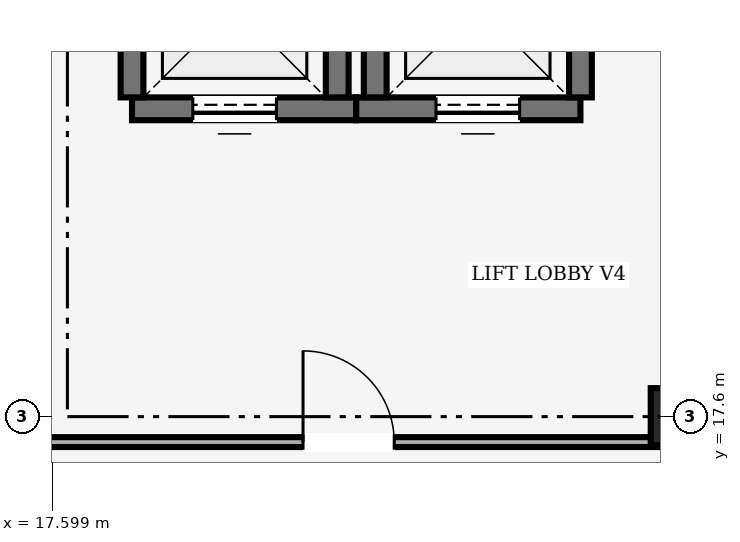
"""IFC4 building model, lengths in metres.
Left out: names, types, materials, properties, quantities, classifications, styles, units other than length and angle.
Written with IfcOpenShell. Run it as: python <this file> out.ifc"""

import sys

from ifc_helpers import new_model, si_unit, direction, frame, frame_2d, origin, origin_2d, place, context, subcontext, project, spatial, rectangle, extrude, element, fill, save


model = new_model("IFC4")
c1 = context("Model", 3, precision=1e-05, world=origin(), true_north=direction((0.0, 1.0)))
c2 = subcontext(c1, "Body", "Model", "MODEL_VIEW")
j1 = project(units=[si_unit("LENGTHUNIT", "METRE"), si_unit("PLANEANGLEUNIT", "RADIAN")], contexts=[c1])
p1 = place(None, origin())
s1 = spatial("IfcSite", under=j1, at=p1, CompositionType="ELEMENT")
p2 = place(p1, origin())
s2 = spatial("IfcBuilding", under=s1, at=p2, CompositionType="ELEMENT")
p3 = place(p2, frame((0.0, 0.0, 15.6)))
s3 = spatial("IfcBuildingStorey", under=s2, at=p3, CompositionType="ELEMENT", Elevation=15.6)
p4 = place(p3, frame((25.8, 17.6, 0.0), z_axis=(0.0, 0.0, 1.0), x_axis=(1.0, 0.0, 0.0)))
e1 = element("IfcColumn", 1, at=p4, inside=s3, PredefinedType="COLUMN", context=c2, shape_type="SweptSolid", body=[
    extrude(rectangle(XDim=0.65, YDim=0.75, at=origin_2d()), origin(), (0.0, 0.0, 1.0), 3.2),
])
p5 = place(p3, frame((21.6, 21.65, 0.0), z_axis=(0.0, 0.0, 1.0), x_axis=(-1.0, 0.0, 0.0)))
e2 = element("IfcWall", 2, at=p5, inside=s3, PredefinedType="SHEAR", context=c2, shape_type="SweptSolid", body=[
    extrude(rectangle(XDim=2.95, YDim=0.3, at=frame_2d((1.475, 0.0))), origin(), (0.0, 0.0, 1.0), 3.2),
])
p6 = place(p5, frame((1.05, 0.0, 0.0)))
e3 = element("IfcOpeningElement", 3, at=p6, cuts=e2, PredefinedType="OPENING", context=c2, shape_type="SweptSolid", body=[
    extrude(rectangle(XDim=1.1, YDim=2.1, at=frame_2d((0.55, 1.05))), frame((0.0, 0.15, 0.0), z_axis=(0.0, -1.0, 0.0), x_axis=(1.0, 0.0, 0.0)), (0.0, 0.0, 1.0), 0.3),
])
for number, where, z_axis, x_axis in (
    (4, (18.65, 21.8, 0.0), (0.0, 0.0, 1.0), (0.0, 1.0, 0.0)),
    (5, (21.35, 24.2, 0.0), (0.0, 0.0, 1.0), (0.0, -1.0, 0.0)),
):
    element("IfcWall", number, at=place(p3, frame(where, z_axis=z_axis, x_axis=x_axis)), inside=s3, PredefinedType="SHEAR", context=c2, shape_type="SweptSolid", body=[
        extrude(rectangle(XDim=2.4, YDim=0.3, at=frame_2d((1.2, 0.0))), origin(), (0.0, 0.0, 1.0), 3.2),
    ])
p7 = place(p3, frame((24.55, 21.65, 0.0), z_axis=(0.0, 0.0, 1.0), x_axis=(-1.0, 0.0, 0.0)))
e6 = element("IfcWall", 6, at=p7, inside=s3, PredefinedType="SHEAR", context=c2, shape_type="SweptSolid", body=[
    extrude(rectangle(XDim=2.95, YDim=0.3, at=frame_2d((1.475, 0.0))), origin(), (0.0, 0.0, 1.0), 3.2),
])
p8 = place(p7, frame((0.8, 0.0, 0.0)))
e7 = element("IfcOpeningElement", 7, at=p8, cuts=e6, PredefinedType="OPENING", context=c2, shape_type="SweptSolid", body=[
    extrude(rectangle(XDim=1.1, YDim=2.1, at=frame_2d((0.55, 1.05))), frame((0.0, 0.15, 0.0), z_axis=(0.0, -1.0, 0.0), x_axis=(1.0, 0.0, 0.0)), (0.0, 0.0, 1.0), 0.3),
])
for number, where, z_axis, x_axis in (
    (8, (21.85, 21.8, 0.0), (0.0, 0.0, 1.0), (0.0, 1.0, 0.0)),
    (9, (24.55, 24.2, 0.0), (0.0, 0.0, 1.0), (0.0, -1.0, 0.0)),
):
    element("IfcWall", number, at=place(p3, frame(where, z_axis=z_axis, x_axis=x_axis)), inside=s3, PredefinedType="SHEAR", context=c2, shape_type="SweptSolid", body=[
        extrude(rectangle(XDim=2.4, YDim=0.3, at=frame_2d((1.2, 0.0))), origin(), (0.0, 0.0, 1.0), 3.2),
    ])
p9 = place(p3, frame((17.135, 17.265, 0.0), z_axis=(0.0, 0.0, 1.0), x_axis=(1.0, 0.0, 0.0)))
e10 = element("IfcWall", 10, at=p9, inside=s3, PredefinedType="PARTITIONING", context=c2, shape_type="SweptSolid", body=[
    extrude(rectangle(XDim=17.33, YDim=0.13, at=frame_2d((8.665, 0.0))), origin(), (0.0, 0.0, 1.0), 2.58),
])
p10 = place(p9, frame((3.765, 0.0, 0.0)))
e11 = element("IfcOpeningElement", 11, at=p10, cuts=e10, PredefinedType="OPENING", context=c2, shape_type="SweptSolid", body=[
    extrude(rectangle(XDim=1.2, YDim=2.15, at=frame_2d((0.6, 1.075))), frame((0.0, 0.065, 0.0), z_axis=(0.0, -1.0, 0.0), x_axis=(1.0, 0.0, 0.0)), (0.0, 0.0, 1.0), 0.13),
])
p11 = place(p6, origin())
e12 = element("IfcDoor", 12, at=p11, inside=s3, OperationType="SLIDING_TO_LEFT", PredefinedType="DOOR", context=c2, shape_type="SweptSolid", body=[
    extrude(rectangle(XDim=1.1, YDim=2.1, at=frame_2d((0.55, 1.05))), frame((0.0, 0.025, 0.0), z_axis=(0.0, -1.0, 0.0), x_axis=(1.0, 0.0, 0.0)), (0.0, 0.0, 1.0), 0.05),
])
fill(e3, e12)
p12 = place(p8, origin())
e13 = element("IfcDoor", 13, at=p12, inside=s3, OperationType="SLIDING_TO_LEFT", PredefinedType="DOOR", context=c2, shape_type="SweptSolid", body=[
    extrude(rectangle(XDim=1.1, YDim=2.1, at=frame_2d((0.55, 1.05))), frame((0.0, 0.025, 0.0), z_axis=(0.0, -1.0, 0.0), x_axis=(1.0, 0.0, 0.0)), (0.0, 0.0, 1.0), 0.05),
])
fill(e7, e13)
p13 = place(p10, origin())
e14 = element("IfcDoor", 14, at=p13, inside=s3, OperationType="SINGLE_SWING_LEFT", PredefinedType="DOOR", context=c2, shape_type="SweptSolid", body=[
    extrude(rectangle(XDim=1.2, YDim=2.15, at=frame_2d((0.6, 1.075))), frame((0.0, 0.025, 0.0), z_axis=(0.0, -1.0, 0.0), x_axis=(1.0, 0.0, 0.0)), (0.0, 0.0, 1.0), 0.05),
])
fill(e11, e14)
save(model, sys.argv[1])
